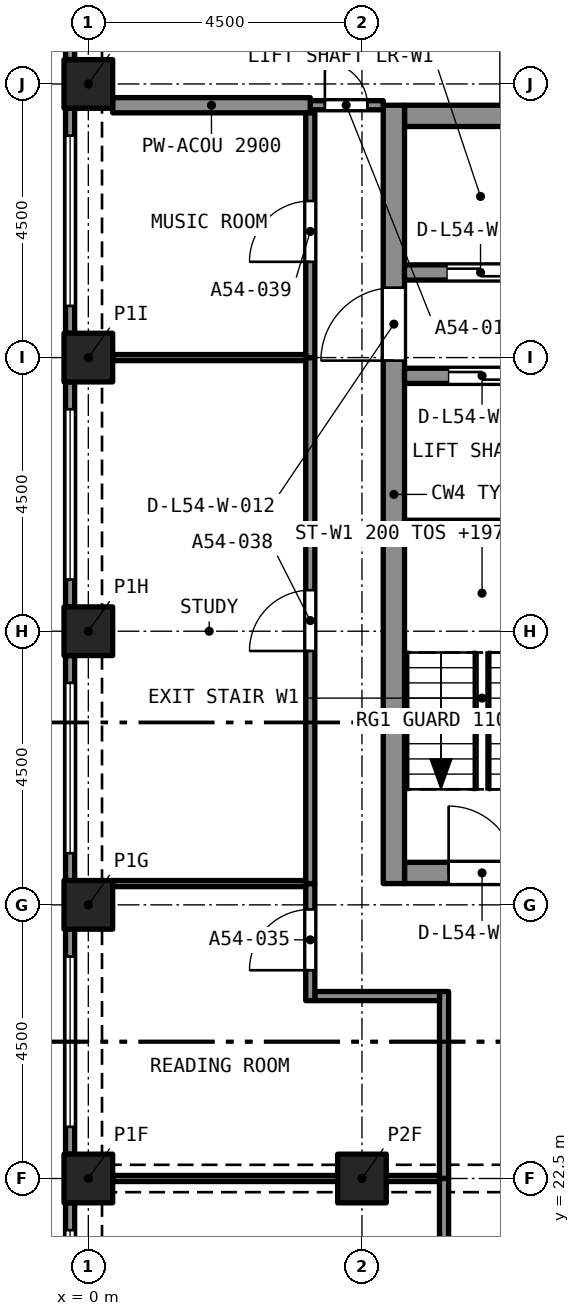
"""IFC4 building model, lengths in metres.
Left out: names, types, materials, properties, quantities, classifications, styles, units other than length and angle.
Written with IfcOpenShell. Run it as: python <this file> out.ifc"""

import sys

from ifc_helpers import new_model, si_unit, direction, frame, frame_2d, origin, origin_2d, place, context, subcontext, project, spatial, rectangle, extrude, element, fill, save


model = new_model("IFC4")
c1 = context("Model", 3, precision=1e-05, world=origin(), true_north=direction((0.0, 1.0)))
c2 = subcontext(c1, "Body", "Model", "MODEL_VIEW")
j1 = project(units=[si_unit("LENGTHUNIT", "METRE"), si_unit("PLANEANGLEUNIT", "RADIAN")], contexts=[c1])
p1 = place(None, origin())
s1 = spatial("IfcSite", under=j1, at=p1, CompositionType="ELEMENT")
p2 = place(p1, origin())
s2 = spatial("IfcBuilding", under=s1, at=p2, CompositionType="ELEMENT")
p3 = place(p2, frame((0.0, 0.0, 195.5)))
s3 = spatial("IfcBuildingStorey", under=s2, at=p3, CompositionType="ELEMENT", Elevation=195.5)
for number, where, z_axis, x_axis in (
    (1, (0.0, 22.5, 0.0), (0.0, 0.0, 1.0), (1.0, 0.0, 0.0)),
    (2, (4.5, 22.5, 0.0), (0.0, 0.0, 1.0), (1.0, 0.0, 0.0)),
    (3, (0.0, 27.0, 0.0), (0.0, 0.0, 1.0), (1.0, 0.0, 0.0)),
    (4, (0.0, 31.5, 0.0), (0.0, 0.0, 1.0), (1.0, 0.0, 0.0)),
    (5, (0.0, 36.0, 0.0), (0.0, 0.0, 1.0), (1.0, 0.0, 0.0)),
    (6, (0.0, 40.5, 0.0), (0.0, 0.0, 1.0), (1.0, 0.0, 0.0)),
):
    element("IfcColumn", number, at=place(p3, frame(where, z_axis=z_axis, x_axis=x_axis)), inside=s3, PredefinedType="COLUMN", context=c2, shape_type="SweptSolid", body=[
        extrude(rectangle(XDim=0.8, YDim=0.8, at=origin_2d()), origin(), (0.0, 0.0, 1.0), 3.2),
    ])
p4 = place(p3, frame((5.2, 27.525, 0.0), z_axis=(0.0, 0.0, 1.0), x_axis=(1.0, 0.0, 0.0)))
e7 = element("IfcWall", 7, at=p4, inside=s3, PredefinedType="SOLIDWALL", context=c2, shape_type="SweptSolid", body=[
    extrude(rectangle(XDim=7.6, YDim=0.35, at=frame_2d((3.8, 0.0))), origin(), (0.0, 0.0, 1.0), 3.2),
])
p5 = place(p4, frame((0.725, 0.0, 0.0)))
e8 = element("IfcOpeningElement", 8, at=p5, cuts=e7, PredefinedType="OPENING", context=c2, shape_type="SweptSolid", body=[
    extrude(rectangle(XDim=1.1, YDim=2.1, at=frame_2d((0.55, 1.05))), frame((0.0, 0.185, 0.0), z_axis=(0.0, -1.0, 0.0), x_axis=(1.0, 0.0, 0.0)), (0.0, 0.0, 1.0), 0.37),
])
p6 = place(p4, frame((3.25, 0.0, 0.0)))
e9 = element("IfcOpeningElement", 9, at=p6, cuts=e7, PredefinedType="OPENING", context=c2, shape_type="SweptSolid", body=[
    extrude(rectangle(XDim=1.1, YDim=2.1, at=frame_2d((0.55, 1.05))), frame((0.0, 0.185, 0.0), z_axis=(0.0, -1.0, 0.0), x_axis=(1.0, 0.0, 0.0)), (0.0, 0.0, 1.0), 0.37),
])
p7 = place(p4, frame((5.775, 0.0, 0.0)))
e10 = element("IfcOpeningElement", 10, at=p7, cuts=e7, PredefinedType="OPENING", context=c2, shape_type="SweptSolid", body=[
    extrude(rectangle(XDim=1.1, YDim=2.1, at=frame_2d((0.55, 1.05))), frame((0.0, 0.185, 0.0), z_axis=(0.0, -1.0, 0.0), x_axis=(1.0, 0.0, 0.0)), (0.0, 0.0, 1.0), 0.37),
])
p8 = place(p3, frame((5.2, 39.975, 0.0), z_axis=(0.0, 0.0, 1.0), x_axis=(1.0, 0.0, 0.0)))
e11 = element("IfcWall", 11, at=p8, inside=s3, PredefinedType="SOLIDWALL", context=c2, shape_type="SweptSolid", body=[
    extrude(rectangle(XDim=7.6, YDim=0.35, at=frame_2d((3.8, 0.0))), origin(), (0.0, 0.0, 1.0), 3.2),
])
p9 = place(p3, frame((5.025, 27.35, 0.0), z_axis=(0.0, 0.0, 1.0), x_axis=(0.0, 1.0, 0.0)))
e12 = element("IfcWall", 12, at=p9, inside=s3, PredefinedType="SOLIDWALL", context=c2, shape_type="SweptSolid", body=[
    extrude(rectangle(XDim=12.8, YDim=0.35, at=frame_2d((6.4, 0.0))), origin(), (0.0, 0.0, 1.0), 3.2),
])
p10 = place(p9, frame((8.6, 0.0, 0.0)))
e13 = element("IfcOpeningElement", 13, at=p10, cuts=e12, PredefinedType="OPENING", context=c2, shape_type="SweptSolid", body=[
    extrude(rectangle(XDim=1.2, YDim=2.1, at=frame_2d((0.6, 1.05))), frame((0.0, 0.185, 0.0), z_axis=(0.0, -1.0, 0.0), x_axis=(1.0, 0.0, 0.0)), (0.0, 0.0, 1.0), 0.37),
])
p11 = place(p3, frame((-0.3, 40.9, 0.0), z_axis=(0.0, 0.0, 1.0), x_axis=(0.0, 1.0, 0.0)))
e14 = element("IfcWall", 14, at=p11, inside=s3, PredefinedType="SOLIDWALL", context=c2, shape_type="SweptSolid", body=[
    extrude(rectangle(XDim=3.7, YDim=0.15, at=frame_2d((1.85, 0.0))), origin(), (0.0, 0.0, 1.0), 3.2),
])
p12 = place(p11, frame((0.45, 0.0, 0.45)))
e15 = element("IfcOpeningElement", 15, at=p12, cuts=e14, PredefinedType="OPENING", context=c2, shape_type="SweptSolid", body=[
    extrude(rectangle(XDim=2.8, YDim=1.95, at=frame_2d((1.4, 0.975))), frame((0.0, 0.085, 0.0), z_axis=(0.0, -1.0, 0.0), x_axis=(1.0, 0.0, 0.0)), (0.0, 0.0, 1.0), 0.17),
])
p13 = place(p3, frame((-0.3, 36.4, 0.0), z_axis=(0.0, 0.0, 1.0), x_axis=(0.0, 1.0, 0.0)))
e16 = element("IfcWall", 16, at=p13, inside=s3, PredefinedType="SOLIDWALL", context=c2, shape_type="SweptSolid", body=[
    extrude(rectangle(XDim=3.7, YDim=0.15, at=frame_2d((1.85, 0.0))), origin(), (0.0, 0.0, 1.0), 3.2),
])
p14 = place(p13, frame((0.45, 0.0, 0.45)))
e17 = element("IfcOpeningElement", 17, at=p14, cuts=e16, PredefinedType="OPENING", context=c2, shape_type="SweptSolid", body=[
    extrude(rectangle(XDim=2.8, YDim=1.95, at=frame_2d((1.4, 0.975))), frame((0.0, 0.085, 0.0), z_axis=(0.0, -1.0, 0.0), x_axis=(1.0, 0.0, 0.0)), (0.0, 0.0, 1.0), 0.17),
])
p15 = place(p3, frame((-0.3, 31.9, 0.0), z_axis=(0.0, 0.0, 1.0), x_axis=(0.0, 1.0, 0.0)))
e18 = element("IfcWall", 18, at=p15, inside=s3, PredefinedType="SOLIDWALL", context=c2, shape_type="SweptSolid", body=[
    extrude(rectangle(XDim=3.7, YDim=0.15, at=frame_2d((1.85, 0.0))), origin(), (0.0, 0.0, 1.0), 3.2),
])
p16 = place(p15, frame((0.45, 0.0, 0.45)))
e19 = element("IfcOpeningElement", 19, at=p16, cuts=e18, PredefinedType="OPENING", context=c2, shape_type="SweptSolid", body=[
    extrude(rectangle(XDim=2.8, YDim=1.95, at=frame_2d((1.4, 0.975))), frame((0.0, 0.085, 0.0), z_axis=(0.0, -1.0, 0.0), x_axis=(1.0, 0.0, 0.0)), (0.0, 0.0, 1.0), 0.17),
])
p17 = place(p3, frame((-0.3, 27.4, 0.0), z_axis=(0.0, 0.0, 1.0), x_axis=(0.0, 1.0, 0.0)))
e20 = element("IfcWall", 20, at=p17, inside=s3, PredefinedType="SOLIDWALL", context=c2, shape_type="SweptSolid", body=[
    extrude(rectangle(XDim=3.7, YDim=0.15, at=frame_2d((1.85, 0.0))), origin(), (0.0, 0.0, 1.0), 3.2),
])
p18 = place(p17, frame((0.45, 0.0, 0.45)))
e21 = element("IfcOpeningElement", 21, at=p18, cuts=e20, PredefinedType="OPENING", context=c2, shape_type="SweptSolid", body=[
    extrude(rectangle(XDim=2.8, YDim=1.95, at=frame_2d((1.4, 0.975))), frame((0.0, 0.085, 0.0), z_axis=(0.0, -1.0, 0.0), x_axis=(1.0, 0.0, 0.0)), (0.0, 0.0, 1.0), 0.17),
])
p19 = place(p3, frame((-0.3, 22.9, 0.0), z_axis=(0.0, 0.0, 1.0), x_axis=(0.0, 1.0, 0.0)))
e22 = element("IfcWall", 22, at=p19, inside=s3, PredefinedType="SOLIDWALL", context=c2, shape_type="SweptSolid", body=[
    extrude(rectangle(XDim=3.7, YDim=0.15, at=frame_2d((1.85, 0.0))), origin(), (0.0, 0.0, 1.0), 3.2),
])
p20 = place(p19, frame((0.45, 0.0, 0.45)))
e23 = element("IfcOpeningElement", 23, at=p20, cuts=e22, PredefinedType="OPENING", context=c2, shape_type="SweptSolid", body=[
    extrude(rectangle(XDim=2.8, YDim=1.95, at=frame_2d((1.4, 0.975))), frame((0.0, 0.085, 0.0), z_axis=(0.0, -1.0, 0.0), x_axis=(1.0, 0.0, 0.0)), (0.0, 0.0, 1.0), 0.17),
])
p21 = place(p3, frame((-0.3, 18.4, 0.0), z_axis=(0.0, 0.0, 1.0), x_axis=(0.0, 1.0, 0.0)))
e24 = element("IfcWall", 24, at=p21, inside=s3, PredefinedType="SOLIDWALL", context=c2, shape_type="SweptSolid", body=[
    extrude(rectangle(XDim=3.7, YDim=0.15, at=frame_2d((1.85, 0.0))), origin(), (0.0, 0.0, 1.0), 3.2),
])
p22 = place(p21, frame((0.45, 0.0, 0.45)))
e25 = element("IfcOpeningElement", 25, at=p22, cuts=e24, PredefinedType="OPENING", context=c2, shape_type="SweptSolid", body=[
    extrude(rectangle(XDim=2.8, YDim=1.95, at=frame_2d((1.4, 0.975))), frame((0.0, 0.085, 0.0), z_axis=(0.0, -1.0, 0.0), x_axis=(1.0, 0.0, 0.0)), (0.0, 0.0, 1.0), 0.17),
])
p23 = place(p3, frame((3.65, 40.15, 0.0), z_axis=(0.0, 0.0, 1.0), x_axis=(1.0, 0.0, 0.0)))
e26 = element("IfcWall", 26, at=p23, inside=s3, PredefinedType="PARTITIONING", context=c2, shape_type="SweptSolid", body=[
    extrude(rectangle(XDim=1.2, YDim=0.15, at=frame_2d((0.6, 0.0))), origin(), (0.0, 0.0, 1.0), 2.9),
])
p24 = place(p23, frame((0.24, 0.0, 0.0)))
e27 = element("IfcOpeningElement", 27, at=p24, cuts=e26, PredefinedType="OPENING", context=c2, shape_type="SweptSolid", body=[
    extrude(rectangle(XDim=0.7, YDim=2.1, at=frame_2d((0.35, 1.05))), frame((0.0, 0.085, 0.0), z_axis=(0.0, -1.0, 0.0), x_axis=(1.0, 0.0, 0.0)), (0.0, 0.0, 1.0), 0.17),
])
p25 = place(p3, frame((0.4, 40.15, 0.0), z_axis=(0.0, 0.0, 1.0), x_axis=(1.0, 0.0, 0.0)))
e28 = element("IfcWall", 28, at=p25, inside=s3, PredefinedType="PARTITIONING", context=c2, shape_type="SweptSolid", body=[
    extrude(rectangle(XDim=3.25, YDim=0.25, at=frame_2d((1.625, 0.0))), origin(), (0.0, 0.0, 1.0), 2.9),
])
p26 = place(p3, frame((5.85, 22.5, 0.0), z_axis=(0.0, 0.0, 1.0), x_axis=(0.0, 1.0, 0.0)))
e29 = element("IfcWall", 29, at=p26, inside=s3, PredefinedType="PARTITIONING", context=c2, shape_type="SweptSolid", body=[
    extrude(rectangle(XDim=3.075, YDim=0.15, at=frame_2d((1.538, 0.0))), origin(), (0.0, 0.0, 1.0), 2.9),
])
p27 = place(p3, frame((3.725, 25.5, 0.0), z_axis=(0.0, 0.0, 1.0), x_axis=(1.0, 0.0, 0.0)))
e30 = element("IfcWall", 30, at=p27, inside=s3, PredefinedType="PARTITIONING", context=c2, shape_type="SweptSolid", body=[
    extrude(rectangle(XDim=2.05, YDim=0.15, at=frame_2d((1.025, 0.0))), origin(), (0.0, 0.0, 1.0), 2.9),
])
p28 = place(p3, frame((3.65, 25.425, 0.0), z_axis=(0.0, 0.0, 1.0), x_axis=(0.0, 1.0, 0.0)))
e31 = element("IfcWall", 31, at=p28, inside=s3, PredefinedType="PARTITIONING", context=c2, shape_type="SweptSolid", body=[
    extrude(rectangle(XDim=1.925, YDim=0.15, at=frame_2d((0.962, 0.0))), origin(), (0.0, 0.0, 1.0), 2.9),
])
p29 = place(p28, frame((0.5, 0.0, 0.0)))
e32 = element("IfcOpeningElement", 32, at=p29, cuts=e31, PredefinedType="OPENING", context=c2, shape_type="SweptSolid", body=[
    extrude(rectangle(XDim=1.0, YDim=2.1, at=frame_2d((0.5, 1.05))), frame((0.0, 0.085, 0.0), z_axis=(0.0, -1.0, 0.0), x_axis=(1.0, 0.0, 0.0)), (0.0, 0.0, 1.0), 0.17),
])
p30 = place(p3, frame((3.65, 27.35, 0.0), z_axis=(0.0, 0.0, 1.0), x_axis=(0.0, 1.0, 0.0)))
e33 = element("IfcWall", 33, at=p30, inside=s3, PredefinedType="PARTITIONING", context=c2, shape_type="SweptSolid", body=[
    extrude(rectangle(XDim=8.65, YDim=0.15, at=frame_2d((4.325, 0.0))), origin(), (0.0, 0.0, 1.0), 2.9),
])
p31 = place(p30, frame((3.825, 0.0, 0.0)))
e34 = element("IfcOpeningElement", 34, at=p31, cuts=e33, PredefinedType="OPENING", context=c2, shape_type="SweptSolid", body=[
    extrude(rectangle(XDim=1.0, YDim=2.1, at=frame_2d((0.5, 1.05))), frame((0.0, 0.085, 0.0), z_axis=(0.0, -1.0, 0.0), x_axis=(1.0, 0.0, 0.0)), (0.0, 0.0, 1.0), 0.17),
])
p32 = place(p3, frame((3.65, 36.0, 0.0), z_axis=(0.0, 0.0, 1.0), x_axis=(0.0, 1.0, 0.0)))
e35 = element("IfcWall", 35, at=p32, inside=s3, PredefinedType="PARTITIONING", context=c2, shape_type="SweptSolid", body=[
    extrude(rectangle(XDim=4.025, YDim=0.15, at=frame_2d((2.012, 0.0))), origin(), (0.0, 0.0, 1.0), 2.9),
])
p33 = place(p32, frame((1.575, 0.0, 0.0)))
e36 = element("IfcOpeningElement", 36, at=p33, cuts=e35, PredefinedType="OPENING", context=c2, shape_type="SweptSolid", body=[
    extrude(rectangle(XDim=1.0, YDim=2.1, at=frame_2d((0.5, 1.05))), frame((0.0, 0.085, 0.0), z_axis=(0.0, -1.0, 0.0), x_axis=(1.0, 0.0, 0.0)), (0.0, 0.0, 1.0), 0.17),
])
p34 = place(p3, frame((5.85, 13.025, 0.0), z_axis=(0.0, 0.0, 1.0), x_axis=(0.0, 1.0, 0.0)))
e37 = element("IfcWall", 37, at=p34, inside=s3, PredefinedType="PARTITIONING", context=c2, shape_type="SweptSolid", body=[
    extrude(rectangle(XDim=9.475, YDim=0.15, at=frame_2d((4.738, 0.0))), origin(), (0.0, 0.0, 1.0), 2.9),
])
p35 = place(p34, frame((4.275, 0.0, 0.0)))
e38 = element("IfcOpeningElement", 38, at=p35, cuts=e37, PredefinedType="OPENING", context=c2, shape_type="SweptSolid", body=[
    extrude(rectangle(XDim=1.0, YDim=2.1, at=frame_2d((0.5, 1.05))), frame((0.0, 0.085, 0.0), z_axis=(0.0, -1.0, 0.0), x_axis=(1.0, 0.0, 0.0)), (0.0, 0.0, 1.0), 0.17),
])
p36 = place(p3, frame((0.4, 27.35, 0.0), z_axis=(0.0, 0.0, 1.0), x_axis=(1.0, 0.0, 0.0)))
e39 = element("IfcWall", 39, at=p36, inside=s3, PredefinedType="PARTITIONING", context=c2, shape_type="SweptSolid", body=[
    extrude(rectangle(XDim=3.175, YDim=0.1, at=frame_2d((1.587, 0.0))), origin(), (0.0, 0.0, 1.0), 2.9),
])
p37 = place(p3, frame((4.9, 22.5, 0.0), z_axis=(0.0, 0.0, 1.0), x_axis=(1.0, 0.0, 0.0)))
e40 = element("IfcWall", 40, at=p37, inside=s3, PredefinedType="PARTITIONING", context=c2, shape_type="SweptSolid", body=[
    extrude(rectangle(XDim=0.875, YDim=0.1, at=frame_2d((0.438, 0.0))), origin(), (0.0, 0.0, 1.0), 2.38),
])
p38 = place(p3, frame((0.4, 22.5, 0.0), z_axis=(0.0, 0.0, 1.0), x_axis=(1.0, 0.0, 0.0)))
e41 = element("IfcWall", 41, at=p38, inside=s3, PredefinedType="PARTITIONING", context=c2, shape_type="SweptSolid", body=[
    extrude(rectangle(XDim=3.7, YDim=0.1, at=frame_2d((1.85, 0.0))), origin(), (0.0, 0.0, 1.0), 2.38),
])
p39 = place(p3, frame((0.4, 36.0, 0.0), z_axis=(0.0, 0.0, 1.0), x_axis=(1.0, 0.0, 0.0)))
e42 = element("IfcWall", 42, at=p39, inside=s3, PredefinedType="PARTITIONING", context=c2, shape_type="SweptSolid", body=[
    extrude(rectangle(XDim=3.175, YDim=0.1, at=frame_2d((1.587, 0.0))), origin(), (0.0, 0.0, 1.0), 2.9),
])
p40 = place(p3, frame((5.2, 33.2, 0.0), z_axis=(0.0, 0.0, 1.0), x_axis=(1.0, 0.0, 0.0)))
e43 = element("IfcWall", 43, at=p40, inside=s3, PredefinedType="SOLIDWALL", context=c2, shape_type="SweptSolid", body=[
    extrude(rectangle(XDim=7.6, YDim=0.25, at=frame_2d((3.8, 0.0))), origin(), (0.0, 0.0, 1.0), 2.9),
])
p41 = place(p40, frame((3.3, 0.0, 0.0)))
e44 = element("IfcOpeningElement", 44, at=p41, cuts=e43, PredefinedType="OPENING", context=c2, shape_type="SweptSolid", body=[
    extrude(rectangle(XDim=1.0, YDim=2.1, at=frame_2d((0.5, 1.05))), frame((0.0, 0.135, 0.0), z_axis=(0.0, -1.0, 0.0), x_axis=(1.0, 0.0, 0.0)), (0.0, 0.0, 1.0), 0.27),
])
p42 = place(p3, frame((5.2, 35.7, 0.0), z_axis=(0.0, 0.0, 1.0), x_axis=(1.0, 0.0, 0.0)))
e45 = element("IfcWall", 45, at=p42, inside=s3, PredefinedType="SOLIDWALL", context=c2, shape_type="SweptSolid", body=[
    extrude(rectangle(XDim=7.6, YDim=0.25, at=frame_2d((3.8, 0.0))), origin(), (0.0, 0.0, 1.0), 2.9),
])
p43 = place(p42, frame((0.725, 0.0, 0.0)))
e46 = element("IfcOpeningElement", 46, at=p43, cuts=e45, PredefinedType="OPENING", context=c2, shape_type="SweptSolid", body=[
    extrude(rectangle(XDim=1.1, YDim=2.4, at=frame_2d((0.55, 1.2))), frame((0.0, 0.135, 0.0), z_axis=(0.0, -1.0, 0.0), x_axis=(1.0, 0.0, 0.0)), (0.0, 0.0, 1.0), 0.27),
])
p44 = place(p42, frame((5.875, 0.0, 0.0)))
e47 = element("IfcOpeningElement", 47, at=p44, cuts=e45, PredefinedType="OPENING", context=c2, shape_type="SweptSolid", body=[
    extrude(rectangle(XDim=0.9, YDim=2.1, at=frame_2d((0.45, 1.05))), frame((0.0, 0.135, 0.0), z_axis=(0.0, -1.0, 0.0), x_axis=(1.0, 0.0, 0.0)), (0.0, 0.0, 1.0), 0.27),
])
p45 = place(p3, frame((5.2, 37.4, 0.0), z_axis=(0.0, 0.0, 1.0), x_axis=(1.0, 0.0, 0.0)))
e48 = element("IfcWall", 48, at=p45, inside=s3, PredefinedType="SOLIDWALL", context=c2, shape_type="SweptSolid", body=[
    extrude(rectangle(XDim=7.6, YDim=0.25, at=frame_2d((3.8, 0.0))), origin(), (0.0, 0.0, 1.0), 2.9),
])
p46 = place(p45, frame((0.7, 0.0, 0.0)))
e49 = element("IfcOpeningElement", 49, at=p46, cuts=e48, PredefinedType="OPENING", context=c2, shape_type="SweptSolid", body=[
    extrude(rectangle(XDim=1.1, YDim=2.4, at=frame_2d((0.55, 1.2))), frame((0.0, 0.135, 0.0), z_axis=(0.0, -1.0, 0.0), x_axis=(1.0, 0.0, 0.0)), (0.0, 0.0, 1.0), 0.27),
])
p47 = place(p14, origin())
e50 = element("IfcWindow", 50, at=p47, inside=s3, PartitioningType="SINGLE_PANEL", PredefinedType="WINDOW", context=c2, shape_type="SweptSolid", body=[
    extrude(rectangle(XDim=2.8, YDim=1.95, at=frame_2d((1.4, 0.975))), frame((0.0, 0.03, 0.0), z_axis=(0.0, -1.0, 0.0), x_axis=(1.0, 0.0, 0.0)), (0.0, 0.0, 1.0), 0.06),
])
fill(e17, e50)
p48 = place(p16, origin())
e51 = element("IfcWindow", 51, at=p48, inside=s3, PartitioningType="SINGLE_PANEL", PredefinedType="WINDOW", context=c2, shape_type="SweptSolid", body=[
    extrude(rectangle(XDim=2.8, YDim=1.95, at=frame_2d((1.4, 0.975))), frame((0.0, 0.03, 0.0), z_axis=(0.0, -1.0, 0.0), x_axis=(1.0, 0.0, 0.0)), (0.0, 0.0, 1.0), 0.06),
])
fill(e19, e51)
p49 = place(p18, origin())
e52 = element("IfcWindow", 52, at=p49, inside=s3, PartitioningType="SINGLE_PANEL", PredefinedType="WINDOW", context=c2, shape_type="SweptSolid", body=[
    extrude(rectangle(XDim=2.8, YDim=1.95, at=frame_2d((1.4, 0.975))), frame((0.0, 0.03, 0.0), z_axis=(0.0, -1.0, 0.0), x_axis=(1.0, 0.0, 0.0)), (0.0, 0.0, 1.0), 0.06),
])
fill(e21, e52)
p50 = place(p20, origin())
e53 = element("IfcWindow", 53, at=p50, inside=s3, PartitioningType="SINGLE_PANEL", PredefinedType="WINDOW", context=c2, shape_type="SweptSolid", body=[
    extrude(rectangle(XDim=2.8, YDim=1.95, at=frame_2d((1.4, 0.975))), frame((0.0, 0.03, 0.0), z_axis=(0.0, -1.0, 0.0), x_axis=(1.0, 0.0, 0.0)), (0.0, 0.0, 1.0), 0.06),
])
fill(e23, e53)
p51 = place(p22, origin())
e54 = element("IfcWindow", 54, at=p51, inside=s3, PartitioningType="SINGLE_PANEL", PredefinedType="WINDOW", context=c2, shape_type="SweptSolid", body=[
    extrude(rectangle(XDim=2.8, YDim=1.95, at=frame_2d((1.4, 0.975))), frame((0.0, 0.03, 0.0), z_axis=(0.0, -1.0, 0.0), x_axis=(1.0, 0.0, 0.0)), (0.0, 0.0, 1.0), 0.06),
])
fill(e25, e54)
p52 = place(p24, origin())
e55 = element("IfcDoor", 55, at=p52, inside=s3, OperationType="SINGLE_SWING_LEFT", PredefinedType="DOOR", context=c2, shape_type="SweptSolid", body=[
    extrude(rectangle(XDim=0.7, YDim=2.1, at=frame_2d((0.35, 1.05))), frame((0.0, 0.025, 0.0), z_axis=(0.0, -1.0, 0.0), x_axis=(1.0, 0.0, 0.0)), (0.0, 0.0, 1.0), 0.05),
])
fill(e27, e55)
p53 = place(p29, origin())
e56 = element("IfcDoor", 56, at=p53, inside=s3, OperationType="SINGLE_SWING_RIGHT", PredefinedType="DOOR", context=c2, shape_type="SweptSolid", body=[
    extrude(rectangle(XDim=1.0, YDim=2.1, at=frame_2d((0.5, 1.05))), frame((0.0, 0.025, 0.0), z_axis=(0.0, -1.0, 0.0), x_axis=(1.0, 0.0, 0.0)), (0.0, 0.0, 1.0), 0.05),
])
fill(e32, e56)
p54 = place(p31, origin())
e57 = element("IfcDoor", 57, at=p54, inside=s3, OperationType="SINGLE_SWING_RIGHT", PredefinedType="DOOR", context=c2, shape_type="SweptSolid", body=[
    extrude(rectangle(XDim=1.0, YDim=2.1, at=frame_2d((0.5, 1.05))), frame((0.0, 0.025, 0.0), z_axis=(0.0, -1.0, 0.0), x_axis=(1.0, 0.0, 0.0)), (0.0, 0.0, 1.0), 0.05),
])
fill(e34, e57)
p55 = place(p33, origin())
e58 = element("IfcDoor", 58, at=p55, inside=s3, OperationType="SINGLE_SWING_RIGHT", PredefinedType="DOOR", context=c2, shape_type="SweptSolid", body=[
    extrude(rectangle(XDim=1.0, YDim=2.1, at=frame_2d((0.5, 1.05))), frame((0.0, 0.025, 0.0), z_axis=(0.0, -1.0, 0.0), x_axis=(1.0, 0.0, 0.0)), (0.0, 0.0, 1.0), 0.05),
])
fill(e36, e58)
p56 = place(p46, origin())
e59 = element("IfcDoor", 59, at=p56, inside=s3, OperationType="SLIDING_TO_LEFT", PredefinedType="DOOR", context=c2, shape_type="SweptSolid", body=[
    extrude(rectangle(XDim=1.1, YDim=2.4, at=frame_2d((0.55, 1.2))), frame((0.0, 0.025, 0.0), z_axis=(0.0, -1.0, 0.0), x_axis=(1.0, 0.0, 0.0)), (0.0, 0.0, 1.0), 0.05),
])
fill(e49, e59)
p57 = place(p43, origin())
e60 = element("IfcDoor", 60, at=p57, inside=s3, OperationType="SLIDING_TO_LEFT", PredefinedType="DOOR", context=c2, shape_type="SweptSolid", body=[
    extrude(rectangle(XDim=1.1, YDim=2.4, at=frame_2d((0.55, 1.2))), frame((0.0, 0.025, 0.0), z_axis=(0.0, -1.0, 0.0), x_axis=(1.0, 0.0, 0.0)), (0.0, 0.0, 1.0), 0.05),
])
fill(e46, e60)
p58 = place(p5, origin())
e61 = element("IfcDoor", 61, at=p58, inside=s3, OperationType="SINGLE_SWING_LEFT", PredefinedType="DOOR", context=c2, shape_type="SweptSolid", body=[
    extrude(rectangle(XDim=1.1, YDim=2.1, at=frame_2d((0.55, 1.05))), frame((0.0, 0.025, 0.0), z_axis=(0.0, -1.0, 0.0), x_axis=(1.0, 0.0, 0.0)), (0.0, 0.0, 1.0), 0.05),
])
fill(e8, e61)
p59 = place(p10, origin())
e62 = element("IfcDoor", 62, at=p59, inside=s3, OperationType="SINGLE_SWING_LEFT", PredefinedType="DOOR", context=c2, shape_type="SweptSolid", body=[
    extrude(rectangle(XDim=1.2, YDim=2.1, at=frame_2d((0.6, 1.05))), frame((0.0, 0.025, 0.0), z_axis=(0.0, -1.0, 0.0), x_axis=(1.0, 0.0, 0.0)), (0.0, 0.0, 1.0), 0.05),
])
fill(e13, e62)
save(model, sys.argv[1])
